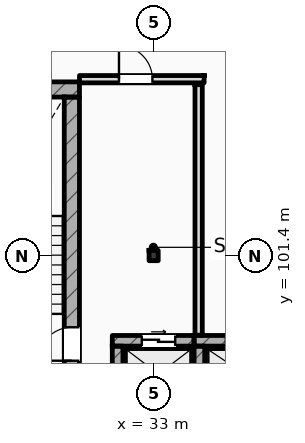
"""IFC4 building model, lengths in metres.
Left out: names, types, materials, properties, quantities, classifications, styles, units other than length and angle.
Written with IfcOpenShell. Run it as: python <this file> out.ifc"""

import sys

from ifc_helpers import new_model, si_unit, direction, frame, frame_2d, origin, origin_2d, place, context, subcontext, project, spatial, rectangle, i_section, extrude, element, fill, save


model = new_model("IFC4")
c1 = context("Model", 3, precision=1e-05, world=origin(), true_north=direction((0.0, 1.0)))
c2 = subcontext(c1, "Body", "Model", "MODEL_VIEW")
j1 = project(units=[si_unit("LENGTHUNIT", "METRE"), si_unit("PLANEANGLEUNIT", "RADIAN")], contexts=[c1])
p1 = place(None, origin())
s1 = spatial("IfcSite", under=j1, at=p1, CompositionType="ELEMENT")
p2 = place(p1, origin())
s2 = spatial("IfcBuilding", under=s1, at=p2, CompositionType="ELEMENT")
p3 = place(p2, frame((0.0, 0.0, 39.0)))
s3 = spatial("IfcBuildingStorey", under=s2, at=p3, CompositionType="ELEMENT", Elevation=39.0)
p4 = place(p3, frame((33.0, 101.4, 0.0), z_axis=(0.0, 0.0, 1.0), x_axis=(1.0, 0.0, 0.0)))
e1 = element("IfcColumn", 1, at=p4, inside=s3, PredefinedType="COLUMN", context=c2, shape_type="SweptSolid", body=[
    extrude(i_section(OverallWidth=0.3, OverallDepth=0.34, WebThickness=0.012, FlangeThickness=0.021, FilletRadius=0.027, at=origin_2d()), origin(), (0.0, 0.0, 1.0), 3.6),
])
p5 = place(p3, frame((25.4, 106.862, 0.0), z_axis=(0.0, 0.0, 1.0), x_axis=(1.0, 0.0, 0.0)))
e2 = element("IfcWall", 2, at=p5, inside=s3, PredefinedType="SHEAR", context=c2, shape_type="SweptSolid", body=[
    extrude(rectangle(XDim=5.16, YDim=0.5, at=frame_2d((2.58, 0.0))), origin(), (0.0, 0.0, 1.0), 3.6),
])
p6 = place(p3, frame((30.31, 97.5, 0.0), z_axis=(0.0, 0.0, 1.0), x_axis=(0.0, 1.0, 0.0)))
e3 = element("IfcWall", 3, at=p6, inside=s3, PredefinedType="SHEAR", context=c2, shape_type="SweptSolid", body=[
    extrude(rectangle(XDim=9.112, YDim=0.5, at=frame_2d((4.556, 0.0))), origin(), (0.0, 0.0, 1.0), 3.6),
])
p7 = place(p6, frame((0.44, 0.0, 0.0)))
e4 = element("IfcOpeningElement", 4, at=p7, cuts=e3, PredefinedType="OPENING", context=c2, shape_type="SweptSolid", body=[
    extrude(rectangle(XDim=1.1, YDim=2.2, at=frame_2d((0.55, 1.1))), frame((0.0, 0.26, 0.0), z_axis=(0.0, -1.0, 0.0), x_axis=(1.0, 0.0, 0.0)), (0.0, 0.0, 1.0), 0.52),
])
p8 = place(p3, frame((31.64, 98.595, 0.0), z_axis=(0.0, 0.0, 1.0), x_axis=(1.0, 0.0, 0.0)))
e5 = element("IfcWall", 5, at=p8, inside=s3, PredefinedType="SHEAR", context=c2, shape_type="SweptSolid", body=[
    extrude(rectangle(XDim=2.69, YDim=0.35, at=frame_2d((1.345, 0.0))), origin(), (0.0, 0.0, 1.0), 3.38),
])
p9 = place(p8, frame((0.97, 0.0, 0.0)))
e6 = element("IfcOpeningElement", 6, at=p9, cuts=e5, PredefinedType="OPENING", context=c2, shape_type="SweptSolid", body=[
    extrude(rectangle(XDim=1.1, YDim=2.2, at=frame_2d((0.55, 1.1))), frame((0.0, 0.185, 0.0), z_axis=(0.0, -1.0, 0.0), x_axis=(1.0, 0.0, 0.0)), (0.0, 0.0, 1.0), 0.37),
])
p10 = place(p3, frame((31.815, 96.58, 0.0), z_axis=(0.0, 0.0, 1.0), x_axis=(0.0, 1.0, 0.0)))
e7 = element("IfcWall", 7, at=p10, inside=s3, PredefinedType="SHEAR", context=c2, shape_type="SweptSolid", body=[
    extrude(rectangle(XDim=1.84, YDim=0.35, at=frame_2d((0.92, 0.0))), origin(), (0.0, 0.0, 1.0), 3.38),
])
p11 = place(p3, frame((34.33, 98.595, 0.0), z_axis=(0.0, 0.0, 1.0), x_axis=(1.0, 0.0, 0.0)))
e8 = element("IfcWall", 8, at=p11, inside=s3, PredefinedType="SHEAR", context=c2, shape_type="SweptSolid", body=[
    extrude(rectangle(XDim=3.34, YDim=0.35, at=frame_2d((1.67, 0.0))), origin(), (0.0, 0.0, 1.0), 3.38),
])
p12 = place(p11, frame((1.045, 0.0, 0.0)))
e9 = element("IfcOpeningElement", 9, at=p12, cuts=e8, PredefinedType="OPENING", context=c2, shape_type="SweptSolid", body=[
    extrude(rectangle(XDim=1.25, YDim=2.25, at=frame_2d((0.625, 1.125))), frame((0.0, 0.185, 0.0), z_axis=(0.0, -1.0, 0.0), x_axis=(1.0, 0.0, 0.0)), (0.0, 0.0, 1.0), 0.37),
])
p13 = place(p3, frame((34.505, 96.58, 0.0), z_axis=(0.0, 0.0, 1.0), x_axis=(0.0, 1.0, 0.0)))
e10 = element("IfcWall", 10, at=p13, inside=s3, PredefinedType="SHEAR", context=c2, shape_type="SweptSolid", body=[
    extrude(rectangle(XDim=1.84, YDim=0.35, at=frame_2d((0.92, 0.0))), origin(), (0.0, 0.0, 1.0), 3.38),
])
p14 = place(p3, frame((34.48, 98.78, 0.0), z_axis=(0.0, 0.0, 1.0), x_axis=(0.0, 1.0, 0.0)))
e11 = element("IfcWall", 11, at=p14, inside=s3, PredefinedType="STANDARD", context=c2, shape_type="SweptSolid", body=[
    extrude(rectangle(XDim=8.24, YDim=0.24, at=frame_2d((4.12, 0.0))), origin(), (0.0, 0.0, 1.0), 3.38),
])
p15 = place(p3, frame((30.56, 107.2, 0.0), z_axis=(0.0, 0.0, 1.0), x_axis=(1.0, 0.0, 0.0)))
e12 = element("IfcWall", 12, at=p15, inside=s3, PredefinedType="STANDARD", context=c2, shape_type="SweptSolid", body=[
    extrude(rectangle(XDim=4.1, YDim=0.24, at=frame_2d((2.05, 0.0))), origin(), (0.0, 0.0, 1.0), 3.38),
])
p16 = place(p15, frame((1.3, 0.0, 0.0)))
e13 = element("IfcOpeningElement", 13, at=p16, cuts=e12, PredefinedType="OPENING", context=c2, shape_type="SweptSolid", body=[
    extrude(rectangle(XDim=1.1, YDim=2.2, at=frame_2d((0.55, 1.1))), frame((0.0, 0.13, 0.0), z_axis=(0.0, -1.0, 0.0), x_axis=(1.0, 0.0, 0.0)), (0.0, 0.0, 1.0), 0.26),
])
p17 = place(p7, origin())
e14 = element("IfcDoor", 14, at=p17, inside=s3, OperationType="SINGLE_SWING_LEFT", PredefinedType="DOOR", context=c2, shape_type="SweptSolid", body=[
    extrude(rectangle(XDim=1.1, YDim=2.2, at=frame_2d((0.55, 1.1))), frame((0.0, 0.025, 0.0), z_axis=(0.0, -1.0, 0.0), x_axis=(1.0, 0.0, 0.0)), (0.0, 0.0, 1.0), 0.05),
])
fill(e4, e14)
p18 = place(p9, origin())
e15 = element("IfcDoor", 15, at=p18, inside=s3, OperationType="SLIDING_TO_LEFT", PredefinedType="DOOR", context=c2, shape_type="SweptSolid", body=[
    extrude(rectangle(XDim=1.1, YDim=2.2, at=frame_2d((0.55, 1.1))), frame((0.0, 0.025, 0.0), z_axis=(0.0, -1.0, 0.0), x_axis=(1.0, 0.0, 0.0)), (0.0, 0.0, 1.0), 0.05),
])
fill(e6, e15)
p19 = place(p16, origin())
e16 = element("IfcDoor", 16, at=p19, inside=s3, OperationType="SINGLE_SWING_LEFT", PredefinedType="DOOR", context=c2, shape_type="SweptSolid", body=[
    extrude(rectangle(XDim=1.1, YDim=2.2, at=frame_2d((0.55, 1.1))), frame((0.0, 0.025, 0.0), z_axis=(0.0, -1.0, 0.0), x_axis=(1.0, 0.0, 0.0)), (0.0, 0.0, 1.0), 0.05),
])
fill(e13, e16)
save(model, sys.argv[1])
